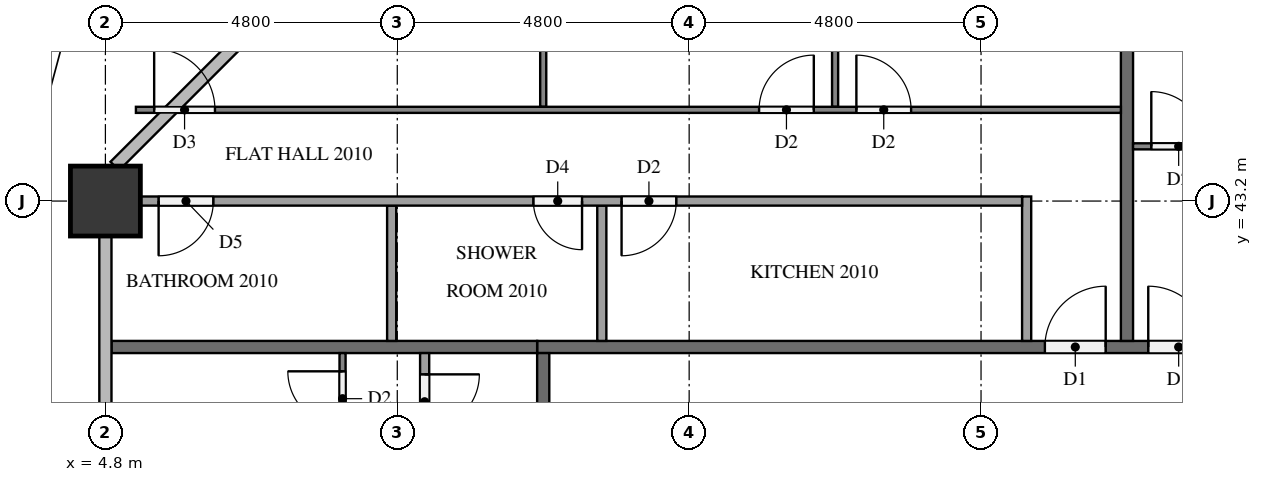
"""IFC4 building model, lengths in metres.
Left out: names, types, materials, properties, quantities, classifications, styles, units other than length and angle.
Written with IfcOpenShell. Run it as: python <this file> out.ifc"""

import sys

from ifc_helpers import new_model, si_unit, direction, frame, frame_2d, origin, origin_2d, place, context, subcontext, project, spatial, rectangle, extrude, element, fill, save


model = new_model("IFC4")
c1 = context("Model", 3, precision=1e-05, world=origin(), true_north=direction((0.0, 1.0)))
c2 = subcontext(c1, "Body", "Model", "MODEL_VIEW")
j1 = project(units=[si_unit("LENGTHUNIT", "METRE"), si_unit("PLANEANGLEUNIT", "RADIAN")], contexts=[c1])
p1 = place(None, origin())
s1 = spatial("IfcSite", under=j1, at=p1, CompositionType="ELEMENT")
p2 = place(p1, origin())
s2 = spatial("IfcBuilding", under=s1, at=p2, CompositionType="ELEMENT")
p3 = place(p2, frame((0.0, 0.0, 80.3)))
s3 = spatial("IfcBuildingStorey", under=s2, at=p3, CompositionType="ELEMENT", Elevation=80.3)
p4 = place(p3, frame((4.8, 43.2, 0.0), z_axis=(0.0, 0.0, 1.0), x_axis=(1.0, 0.0, 0.0)))
e1 = element("IfcColumn", 1, at=p4, inside=s3, PredefinedType="COLUMN", context=c2, shape_type="SweptSolid", body=[
    extrude(rectangle(XDim=1.15, YDim=1.15, at=origin_2d()), origin(), (0.0, 0.0, 1.0), 3.1),
])
p5 = place(p3, frame((11.9, 40.8, 0.0), z_axis=(0.0, 0.0, 1.0), x_axis=(1.0, 0.0, 0.0)))
e2 = element("IfcWall", 2, at=p5, inside=s3, PredefinedType="PARTITIONING", context=c2, shape_type="SweptSolid", body=[
    extrude(rectangle(XDim=38.6, YDim=0.2, at=frame_2d((19.3, 0.0))), origin(), (0.0, 0.0, 1.0), 3.1),
])
p6 = place(p5, frame((37.15, 0.0, 0.0)))
e3 = element("IfcOpeningElement", 3, at=p6, cuts=e2, PredefinedType="OPENING", context=c2, shape_type="SweptSolid", body=[
    extrude(rectangle(XDim=1.0, YDim=2.1, at=frame_2d((0.5, 1.05))), frame((0.0, 0.11, 0.0), z_axis=(0.0, -1.0, 0.0), x_axis=(1.0, 0.0, 0.0)), (0.0, 0.0, 1.0), 0.22),
])
p7 = place(p5, frame((10.05, 0.0, 0.0)))
e4 = element("IfcOpeningElement", 4, at=p7, cuts=e2, PredefinedType="OPENING", context=c2, shape_type="SweptSolid", body=[
    extrude(rectangle(XDim=1.0, YDim=2.1, at=frame_2d((0.5, 1.05))), frame((0.0, 0.11, 0.0), z_axis=(0.0, -1.0, 0.0), x_axis=(1.0, 0.0, 0.0)), (0.0, 0.0, 1.0), 0.22),
])
p8 = place(p5, frame((8.35, 0.0, 0.0)))
e5 = element("IfcOpeningElement", 5, at=p8, cuts=e2, PredefinedType="OPENING", context=c2, shape_type="SweptSolid", body=[
    extrude(rectangle(XDim=1.0, YDim=2.1, at=frame_2d((0.5, 1.05))), frame((0.0, 0.11, 0.0), z_axis=(0.0, -1.0, 0.0), x_axis=(1.0, 0.0, 0.0)), (0.0, 0.0, 1.0), 0.22),
])
p9 = place(p3, frame((12.0, 12.1, 0.0), z_axis=(0.0, 0.0, 1.0), x_axis=(0.0, 1.0, 0.0)))
e6 = element("IfcWall", 6, at=p9, inside=s3, PredefinedType="PARTITIONING", context=c2, shape_type="SweptSolid", body=[
    extrude(rectangle(XDim=28.6, YDim=0.2, at=frame_2d((14.3, 0.0))), origin(), (0.0, 0.0, 1.0), 3.1),
])
p10 = place(p9, frame((17.05, 0.0, 0.0)))
e7 = element("IfcOpeningElement", 7, at=p10, cuts=e6, PredefinedType="OPENING", context=c2, shape_type="SweptSolid", body=[
    extrude(rectangle(XDim=1.0, YDim=2.1, at=frame_2d((0.5, 1.05))), frame((0.0, 0.11, 0.0), z_axis=(0.0, -1.0, 0.0), x_axis=(1.0, 0.0, 0.0)), (0.0, 0.0, 1.0), 0.22),
])
p11 = place(p9, frame((15.35, 0.0, 0.0)))
e8 = element("IfcOpeningElement", 8, at=p11, cuts=e6, PredefinedType="OPENING", context=c2, shape_type="SweptSolid", body=[
    extrude(rectangle(XDim=1.0, YDim=2.1, at=frame_2d((0.5, 1.05))), frame((0.0, 0.11, 0.0), z_axis=(0.0, -1.0, 0.0), x_axis=(1.0, 0.0, 0.0)), (0.0, 0.0, 1.0), 0.22),
])
p12 = place(p9, frame((8.15, 0.0, 0.0)))
e9 = element("IfcOpeningElement", 9, at=p12, cuts=e6, PredefinedType="OPENING", context=c2, shape_type="SweptSolid", body=[
    extrude(rectangle(XDim=1.0, YDim=2.1, at=frame_2d((0.5, 1.05))), frame((0.0, 0.11, 0.0), z_axis=(0.0, -1.0, 0.0), x_axis=(1.0, 0.0, 0.0)), (0.0, 0.0, 1.0), 0.22),
])
for number, where, z_axis, x_axis in (
    (10, (21.6, 47.9, 0.0), (0.0, 0.0, 1.0), (0.0, -1.0, 0.0)),
    (11, (4.9, 40.8, 0.0), (0.0, 0.0, 1.0), (1.0, 0.0, 0.0)),
):
    element("IfcWall", number, at=place(p3, frame(where, z_axis=z_axis, x_axis=x_axis)), inside=s3, PredefinedType="PARTITIONING", context=c2, shape_type="SweptSolid", body=[
        extrude(rectangle(XDim=7.0, YDim=0.2, at=frame_2d((3.5, 0.0))), origin(), (0.0, 0.0, 1.0), 3.1),
    ])
p13 = place(p3, frame((21.7, 44.1, 0.0), z_axis=(0.0, 0.0, 1.0), x_axis=(1.0, 0.0, 0.0)))
e12 = element("IfcWall", 12, at=p13, inside=s3, PredefinedType="PARTITIONING", context=c2, shape_type="SweptSolid", body=[
    extrude(rectangle(XDim=11.8, YDim=0.1, at=frame_2d((5.9, 0.0))), origin(), (0.0, 0.0, 1.0), 3.1),
])
p14 = place(p13, frame((0.3, 0.0, 0.0)))
e13 = element("IfcOpeningElement", 13, at=p14, cuts=e12, PredefinedType="OPENING", context=c2, shape_type="SweptSolid", body=[
    extrude(rectangle(XDim=0.9, YDim=2.1, at=frame_2d((0.45, 1.05))), frame((0.0, 0.06, 0.0), z_axis=(0.0, -1.0, 0.0), x_axis=(1.0, 0.0, 0.0)), (0.0, 0.0, 1.0), 0.12),
])
p15 = place(p13, frame((10.5, 0.0, 0.0)))
e14 = element("IfcOpeningElement", 14, at=p15, cuts=e12, PredefinedType="OPENING", context=c2, shape_type="SweptSolid", body=[
    extrude(rectangle(XDim=1.0, YDim=2.1, at=frame_2d((0.5, 1.05))), frame((0.0, 0.06, 0.0), z_axis=(0.0, -1.0, 0.0), x_axis=(1.0, 0.0, 0.0)), (0.0, 0.0, 1.0), 0.12),
])
for number, where, z_axis, x_axis in (
    (15, (16.8, 44.75, 0.0), (0.0, 0.0, 1.0), (0.0, 1.0, 0.0)),
    (16, (12.0, 44.75, 0.0), (0.0, 0.0, 1.0), (0.0, 1.0, 0.0)),
):
    element("IfcWall", number, at=place(p3, frame(where, z_axis=z_axis, x_axis=x_axis)), inside=s3, PredefinedType="PARTITIONING", context=c2, shape_type="SweptSolid", body=[
        extrude(rectangle(XDim=3.15, YDim=0.1, at=frame_2d((1.575, 0.0))), origin(), (0.0, 0.0, 1.0), 3.1),
    ])
p16 = place(p3, frame((5.302, 44.7, 0.0), z_axis=(0.0, 0.0, 1.0), x_axis=(1.0, 0.0, 0.0)))
e17 = element("IfcWall", 17, at=p16, inside=s3, PredefinedType="PARTITIONING", context=c2, shape_type="SweptSolid", body=[
    extrude(rectangle(XDim=16.198, YDim=0.1, at=frame_2d((8.099, 0.0))), origin(), (0.0, 0.0, 1.0), 3.1),
])
p17 = place(p16, frame((11.848, 0.0, 0.0)))
e18 = element("IfcOpeningElement", 18, at=p17, cuts=e17, PredefinedType="OPENING", context=c2, shape_type="SweptSolid", body=[
    extrude(rectangle(XDim=0.9, YDim=2.1, at=frame_2d((0.45, 1.05))), frame((0.0, 0.06, 0.0), z_axis=(0.0, -1.0, 0.0), x_axis=(1.0, 0.0, 0.0)), (0.0, 0.0, 1.0), 0.12),
])
p18 = place(p16, frame((10.248, 0.0, 0.0)))
e19 = element("IfcOpeningElement", 19, at=p18, cuts=e17, PredefinedType="OPENING", context=c2, shape_type="SweptSolid", body=[
    extrude(rectangle(XDim=0.9, YDim=2.1, at=frame_2d((0.45, 1.05))), frame((0.0, 0.06, 0.0), z_axis=(0.0, -1.0, 0.0), x_axis=(1.0, 0.0, 0.0)), (0.0, 0.0, 1.0), 0.12),
])
p19 = place(p16, frame((0.3, 0.0, 0.0)))
e20 = element("IfcOpeningElement", 20, at=p19, cuts=e17, PredefinedType="OPENING", context=c2, shape_type="SweptSolid", body=[
    extrude(rectangle(XDim=1.0, YDim=2.1, at=frame_2d((0.5, 1.05))), frame((0.0, 0.06, 0.0), z_axis=(0.0, -1.0, 0.0), x_axis=(1.0, 0.0, 0.0)), (0.0, 0.0, 1.0), 0.12),
])
for number, where, z_axis, x_axis in (
    (21, (12.963, 40.9, 0.0), (0.0, 0.0, 1.0), (0.0, 1.0, 0.0)),
    (22, (9.508, 40.9, 0.0), (0.0, 0.0, 1.0), (0.0, 1.0, 0.0)),
):
    element("IfcWall", number, at=place(p3, frame(where, z_axis=z_axis, x_axis=x_axis)), inside=s3, PredefinedType="PARTITIONING", context=c2, shape_type="SweptSolid", body=[
        extrude(rectangle(XDim=2.225, YDim=0.15, at=frame_2d((1.113, 0.0))), origin(), (0.0, 0.0, 1.0), 3.1),
    ])
p20 = place(p3, frame((19.95, 40.9, 0.0), z_axis=(0.0, 0.0, 1.0), x_axis=(0.0, 1.0, 0.0)))
e23 = element("IfcWall", 23, at=p20, inside=s3, PredefinedType="PARTITIONING", context=c2, shape_type="SweptSolid", body=[
    extrude(rectangle(XDim=2.375, YDim=0.15, at=frame_2d((1.188, 0.0))), origin(), (0.0, 0.0, 1.0), 3.1),
])
p21 = place(p3, frame((19.875, 43.2, 0.0), z_axis=(0.0, 0.0, 1.0), x_axis=(-1.0, 0.0, 0.0)))
e24 = element("IfcWall", 24, at=p21, inside=s3, PredefinedType="PARTITIONING", context=c2, shape_type="SweptSolid", body=[
    extrude(rectangle(XDim=14.5, YDim=0.15, at=frame_2d((7.25, 0.0))), origin(), (0.0, 0.0, 1.0), 3.1),
])
p22 = place(p21, frame((5.687, 0.0, 0.0)))
e25 = element("IfcOpeningElement", 25, at=p22, cuts=e24, PredefinedType="OPENING", context=c2, shape_type="SweptSolid", body=[
    extrude(rectangle(XDim=0.9, YDim=2.1, at=frame_2d((0.45, 1.05))), frame((0.0, 0.085, 0.0), z_axis=(0.0, -1.0, 0.0), x_axis=(1.0, 0.0, 0.0)), (0.0, 0.0, 1.0), 0.17),
])
p23 = place(p21, frame((7.237, 0.0, 0.0)))
e26 = element("IfcOpeningElement", 26, at=p23, cuts=e24, PredefinedType="OPENING", context=c2, shape_type="SweptSolid", body=[
    extrude(rectangle(XDim=0.8, YDim=2.1, at=frame_2d((0.4, 1.05))), frame((0.0, 0.085, 0.0), z_axis=(0.0, -1.0, 0.0), x_axis=(1.0, 0.0, 0.0)), (0.0, 0.0, 1.0), 0.17),
])
p24 = place(p21, frame((13.3, 0.0, 0.0)))
e27 = element("IfcOpeningElement", 27, at=p24, cuts=e24, PredefinedType="OPENING", context=c2, shape_type="SweptSolid", body=[
    extrude(rectangle(XDim=0.9, YDim=2.1, at=frame_2d((0.45, 1.05))), frame((0.0, 0.085, 0.0), z_axis=(0.0, -1.0, 0.0), x_axis=(1.0, 0.0, 0.0)), (0.0, 0.0, 1.0), 0.17),
])
p25 = place(p3, frame((8.7, 28.9, 0.0), z_axis=(0.0, 0.0, 1.0), x_axis=(0.0, 1.0, 0.0)))
e28 = element("IfcWall", 28, at=p25, inside=s3, PredefinedType="PARTITIONING", context=c2, shape_type="SweptSolid", body=[
    extrude(rectangle(XDim=11.8, YDim=0.1, at=frame_2d((5.9, 0.0))), origin(), (0.0, 0.0, 1.0), 3.1),
])
p26 = place(p25, frame((0.3, 0.0, 0.0)))
e29 = element("IfcOpeningElement", 29, at=p26, cuts=e28, PredefinedType="OPENING", context=c2, shape_type="SweptSolid", body=[
    extrude(rectangle(XDim=1.0, YDim=2.1, at=frame_2d((0.5, 1.05))), frame((0.0, 0.06, 0.0), z_axis=(0.0, -1.0, 0.0), x_axis=(1.0, 0.0, 0.0)), (0.0, 0.0, 1.0), 0.12),
])
p27 = place(p25, frame((10.6, 0.0, 0.0)))
e30 = element("IfcOpeningElement", 30, at=p27, cuts=e28, PredefinedType="OPENING", context=c2, shape_type="SweptSolid", body=[
    extrude(rectangle(XDim=0.9, YDim=2.1, at=frame_2d((0.45, 1.05))), frame((0.0, 0.06, 0.0), z_axis=(0.0, -1.0, 0.0), x_axis=(1.0, 0.0, 0.0)), (0.0, 0.0, 1.0), 0.12),
])
p28 = place(p3, frame((10.05, 40.7, 0.0), z_axis=(0.0, 0.0, 1.0), x_axis=(0.0, -1.0, 0.0)))
e31 = element("IfcWall", 31, at=p28, inside=s3, PredefinedType="PARTITIONING", context=c2, shape_type="SweptSolid", body=[
    extrude(rectangle(XDim=10.175, YDim=0.15, at=frame_2d((5.087, 0.0))), origin(), (0.0, 0.0, 1.0), 3.1),
])
p29 = place(p28, frame((9.075, 0.0, 0.0)))
e32 = element("IfcOpeningElement", 32, at=p29, cuts=e31, PredefinedType="OPENING", context=c2, shape_type="SweptSolid", body=[
    extrude(rectangle(XDim=0.8, YDim=2.1, at=frame_2d((0.4, 1.05))), frame((0.0, 0.085, 0.0), z_axis=(0.0, -1.0, 0.0), x_axis=(1.0, 0.0, 0.0)), (0.0, 0.0, 1.0), 0.17),
])
p30 = place(p28, frame((0.35, 0.0, 0.0)))
e33 = element("IfcOpeningElement", 33, at=p30, cuts=e31, PredefinedType="OPENING", context=c2, shape_type="SweptSolid", body=[
    extrude(rectangle(XDim=0.9, YDim=2.1, at=frame_2d((0.45, 1.05))), frame((0.0, 0.085, 0.0), z_axis=(0.0, -1.0, 0.0), x_axis=(1.0, 0.0, 0.0)), (0.0, 0.0, 1.0), 0.17),
])
p31 = place(p7, origin())
e34 = element("IfcDoor", 34, at=p31, inside=s3, OperationType="SINGLE_SWING_LEFT", PredefinedType="DOOR", context=c2, shape_type="SweptSolid", body=[
    extrude(rectangle(XDim=1.0, YDim=2.1, at=frame_2d((0.5, 1.05))), frame((0.0, 0.025, 0.0), z_axis=(0.0, -1.0, 0.0), x_axis=(1.0, 0.0, 0.0)), (0.0, 0.0, 1.0), 0.05),
])
fill(e4, e34)
p32 = place(p8, origin())
e35 = element("IfcDoor", 35, at=p32, inside=s3, OperationType="SINGLE_SWING_RIGHT", PredefinedType="DOOR", context=c2, shape_type="SweptSolid", body=[
    extrude(rectangle(XDim=1.0, YDim=2.1, at=frame_2d((0.5, 1.05))), frame((0.0, 0.025, 0.0), z_axis=(0.0, -1.0, 0.0), x_axis=(1.0, 0.0, 0.0)), (0.0, 0.0, 1.0), 0.05),
])
fill(e5, e35)
p33 = place(p14, origin())
e36 = element("IfcDoor", 36, at=p33, inside=s3, OperationType="SINGLE_SWING_LEFT", PredefinedType="DOOR", context=c2, shape_type="SweptSolid", body=[
    extrude(rectangle(XDim=0.9, YDim=2.1, at=frame_2d((0.45, 1.05))), frame((0.0, 0.025, 0.0), z_axis=(0.0, -1.0, 0.0), x_axis=(1.0, 0.0, 0.0)), (0.0, 0.0, 1.0), 0.05),
])
fill(e13, e36)
p34 = place(p17, origin())
e37 = element("IfcDoor", 37, at=p34, inside=s3, OperationType="SINGLE_SWING_LEFT", PredefinedType="DOOR", context=c2, shape_type="SweptSolid", body=[
    extrude(rectangle(XDim=0.9, YDim=2.1, at=frame_2d((0.45, 1.05))), frame((0.0, 0.025, 0.0), z_axis=(0.0, -1.0, 0.0), x_axis=(1.0, 0.0, 0.0)), (0.0, 0.0, 1.0), 0.05),
])
fill(e18, e37)
p35 = place(p18, origin())
e38 = element("IfcDoor", 38, at=p35, inside=s3, OperationType="SINGLE_SWING_RIGHT", PredefinedType="DOOR", context=c2, shape_type="SweptSolid", body=[
    extrude(rectangle(XDim=0.9, YDim=2.1, at=frame_2d((0.45, 1.05))), frame((0.0, 0.025, 0.0), z_axis=(0.0, -1.0, 0.0), x_axis=(1.0, 0.0, 0.0)), (0.0, 0.0, 1.0), 0.05),
])
fill(e19, e38)
p36 = place(p19, origin())
e39 = element("IfcDoor", 39, at=p36, inside=s3, OperationType="SINGLE_SWING_LEFT", PredefinedType="DOOR", context=c2, shape_type="SweptSolid", body=[
    extrude(rectangle(XDim=1.0, YDim=2.1, at=frame_2d((0.5, 1.05))), frame((0.0, 0.025, 0.0), z_axis=(0.0, -1.0, 0.0), x_axis=(1.0, 0.0, 0.0)), (0.0, 0.0, 1.0), 0.05),
])
fill(e20, e39)
p37 = place(p22, origin())
e40 = element("IfcDoor", 40, at=p37, inside=s3, OperationType="SINGLE_SWING_RIGHT", PredefinedType="DOOR", context=c2, shape_type="SweptSolid", body=[
    extrude(rectangle(XDim=0.9, YDim=2.1, at=frame_2d((0.45, 1.05))), frame((0.0, 0.025, 0.0), z_axis=(0.0, -1.0, 0.0), x_axis=(1.0, 0.0, 0.0)), (0.0, 0.0, 1.0), 0.05),
])
fill(e25, e40)
p38 = place(p23, origin())
e41 = element("IfcDoor", 41, at=p38, inside=s3, OperationType="SINGLE_SWING_LEFT", PredefinedType="DOOR", context=c2, shape_type="SweptSolid", body=[
    extrude(rectangle(XDim=0.8, YDim=2.1, at=frame_2d((0.4, 1.05))), frame((0.0, 0.025, 0.0), z_axis=(0.0, -1.0, 0.0), x_axis=(1.0, 0.0, 0.0)), (0.0, 0.0, 1.0), 0.05),
])
fill(e26, e41)
p39 = place(p24, origin())
e42 = element("IfcDoor", 42, at=p39, inside=s3, OperationType="SINGLE_SWING_RIGHT", PredefinedType="DOOR", context=c2, shape_type="SweptSolid", body=[
    extrude(rectangle(XDim=0.9, YDim=2.1, at=frame_2d((0.45, 1.05))), frame((0.0, 0.025, 0.0), z_axis=(0.0, -1.0, 0.0), x_axis=(1.0, 0.0, 0.0)), (0.0, 0.0, 1.0), 0.05),
])
fill(e27, e42)
p40 = place(p27, origin())
e43 = element("IfcDoor", 43, at=p40, inside=s3, OperationType="SINGLE_SWING_RIGHT", PredefinedType="DOOR", context=c2, shape_type="SweptSolid", body=[
    extrude(rectangle(XDim=0.9, YDim=2.1, at=frame_2d((0.45, 1.05))), frame((0.0, 0.025, 0.0), z_axis=(0.0, -1.0, 0.0), x_axis=(1.0, 0.0, 0.0)), (0.0, 0.0, 1.0), 0.05),
])
fill(e30, e43)
p41 = place(p30, origin())
e44 = element("IfcDoor", 44, at=p41, inside=s3, OperationType="SINGLE_SWING_LEFT", PredefinedType="DOOR", context=c2, shape_type="SweptSolid", body=[
    extrude(rectangle(XDim=0.9, YDim=2.1, at=frame_2d((0.45, 1.05))), frame((0.0, 0.025, 0.0), z_axis=(0.0, -1.0, 0.0), x_axis=(1.0, 0.0, 0.0)), (0.0, 0.0, 1.0), 0.05),
])
fill(e33, e44)
save(model, sys.argv[1])
